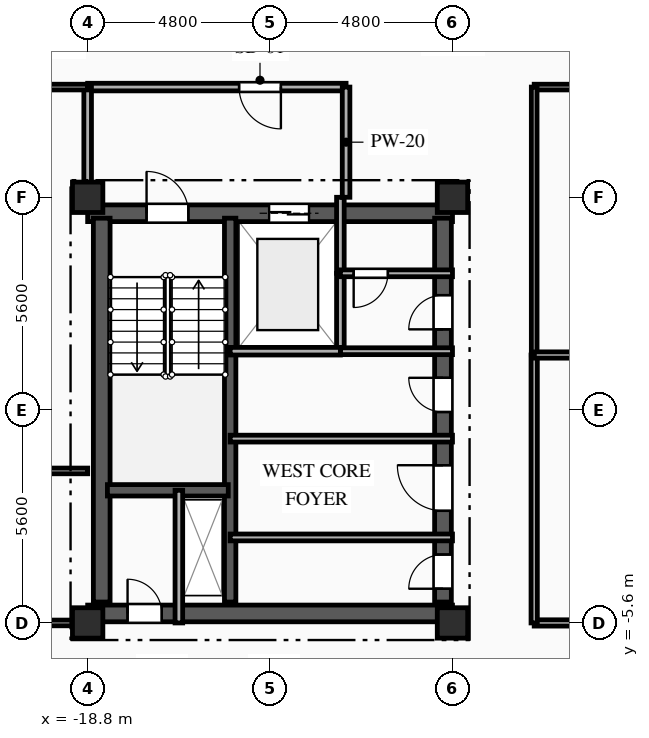
"""IFC4 building model, lengths in metres.
Left out: names, types, materials, properties, quantities, classifications, styles, units other than length and angle.
Written with IfcOpenShell. Run it as: python <this file> out.ifc"""

import sys

from ifc_helpers import new_model, si_unit, direction, frame, frame_2d, origin, origin_2d, place, context, subcontext, project, spatial, rectangle, extrude, element, fill, save


model = new_model("IFC4")
c1 = context("Model", 3, precision=1e-05, world=origin(), true_north=direction((0.0, 1.0)))
c2 = subcontext(c1, "Body", "Model", "MODEL_VIEW")
j1 = project(units=[si_unit("LENGTHUNIT", "METRE"), si_unit("PLANEANGLEUNIT", "RADIAN")], contexts=[c1])
p1 = place(None, origin())
s1 = spatial("IfcSite", under=j1, at=p1, CompositionType="ELEMENT")
p2 = place(p1, origin())
s2 = spatial("IfcBuilding", under=s1, at=p2, CompositionType="ELEMENT")
p3 = place(p2, frame((0.0, 0.0, 228.3)))
s3 = spatial("IfcBuildingStorey", under=s2, at=p3, CompositionType="ELEMENT", Elevation=228.3)
for number, where, z_axis, x_axis in (
    (1, (-18.8, -5.6, 0.0), (0.0, 0.0, 1.0), (1.0, 0.0, 0.0)),
    (2, (-18.8, 5.6, 0.0), (0.0, 0.0, 1.0), (1.0, 0.0, 0.0)),
    (3, (-9.2, -5.6, 0.0), (0.0, 0.0, 1.0), (1.0, 0.0, 0.0)),
    (4, (-9.2, 5.6, 0.0), (0.0, 0.0, 1.0), (1.0, 0.0, 0.0)),
):
    element("IfcColumn", number, at=place(p3, frame(where, z_axis=z_axis, x_axis=x_axis)), inside=s3, PredefinedType="COLUMN", context=c2, shape_type="SweptSolid", body=[
        extrude(rectangle(XDim=0.8, YDim=0.8, at=origin_2d()), origin(), (0.0, 0.0, 1.0), 3.35),
    ])
p4 = place(p3, frame((-18.8, 5.18, 0.0), z_axis=(0.0, 0.0, 1.0), x_axis=(1.0, 0.0, 0.0)))
e5 = element("IfcWall", 5, at=p4, inside=s3, PredefinedType="SHEAR", context=c2, shape_type="SweptSolid", body=[
    extrude(rectangle(XDim=9.6, YDim=0.44, at=frame_2d((4.8, 0.0))), origin(), (0.0, 0.0, 1.0), 3.04),
])
p5 = place(p4, frame((1.55, 0.0, 0.0)))
e6 = element("IfcOpeningElement", 6, at=p5, cuts=e5, PredefinedType="OPENING", context=c2, shape_type="SweptSolid", body=[
    extrude(rectangle(XDim=1.1, YDim=2.15, at=frame_2d((0.55, 1.075))), frame((0.0, 0.23, 0.0), z_axis=(0.0, -1.0, 0.0), x_axis=(1.0, 0.0, 0.0)), (0.0, 0.0, 1.0), 0.46),
])
p6 = place(p4, frame((4.775, 0.0, 0.0)))
e7 = element("IfcOpeningElement", 7, at=p6, cuts=e5, PredefinedType="OPENING", context=c2, shape_type="SweptSolid", body=[
    extrude(rectangle(XDim=1.05, YDim=2.1, at=frame_2d((0.525, 1.05))), frame((0.0, 0.23, 0.0), z_axis=(0.0, -1.0, 0.0), x_axis=(1.0, 0.0, 0.0)), (0.0, 0.0, 1.0), 0.46),
])
p7 = place(p3, frame((-18.8, -5.35, 0.0), z_axis=(0.0, 0.0, 1.0), x_axis=(1.0, 0.0, 0.0)))
e8 = element("IfcWall", 8, at=p7, inside=s3, PredefinedType="SHEAR", context=c2, shape_type="SweptSolid", body=[
    extrude(rectangle(XDim=9.6, YDim=0.44, at=frame_2d((4.8, 0.0))), origin(), (0.0, 0.0, 1.0), 3.04),
])
p8 = place(p7, frame((1.05, 0.0, 0.0)))
e9 = element("IfcOpeningElement", 9, at=p8, cuts=e8, PredefinedType="OPENING", context=c2, shape_type="SweptSolid", body=[
    extrude(rectangle(XDim=0.9, YDim=2.1, at=frame_2d((0.45, 1.05))), frame((0.0, 0.23, 0.0), z_axis=(0.0, -1.0, 0.0), x_axis=(1.0, 0.0, 0.0)), (0.0, 0.0, 1.0), 0.46),
])
p9 = place(p3, frame((-18.43, -5.05, 0.0), z_axis=(0.0, 0.0, 1.0), x_axis=(0.0, 1.0, 0.0)))
e10 = element("IfcWall", 10, at=p9, inside=s3, PredefinedType="SHEAR", context=c2, shape_type="SweptSolid", body=[
    extrude(rectangle(XDim=10.1, YDim=0.44, at=frame_2d((5.05, 0.0))), origin(), (0.0, 0.0, 1.0), 3.04),
])
p10 = place(p3, frame((-9.45, -5.05, 0.0), z_axis=(0.0, 0.0, 1.0), x_axis=(0.0, 1.0, 0.0)))
e11 = element("IfcWall", 11, at=p10, inside=s3, PredefinedType="SHEAR", context=c2, shape_type="SweptSolid", body=[
    extrude(rectangle(XDim=10.1, YDim=0.44, at=frame_2d((5.05, 0.0))), origin(), (0.0, 0.0, 1.0), 3.04),
])
p11 = place(p10, frame((7.175, 0.0, 0.0)))
e12 = element("IfcOpeningElement", 12, at=p11, cuts=e11, PredefinedType="OPENING", context=c2, shape_type="SweptSolid", body=[
    extrude(rectangle(XDim=0.9, YDim=2.1, at=frame_2d((0.45, 1.05))), frame((0.0, 0.23, 0.0), z_axis=(0.0, -1.0, 0.0), x_axis=(1.0, 0.0, 0.0)), (0.0, 0.0, 1.0), 0.46),
])
p12 = place(p10, frame((2.4, 0.0, 0.0)))
e13 = element("IfcOpeningElement", 13, at=p12, cuts=e11, PredefinedType="OPENING", context=c2, shape_type="SweptSolid", body=[
    extrude(rectangle(XDim=1.2, YDim=2.15, at=frame_2d((0.6, 1.075))), frame((0.0, 0.23, 0.0), z_axis=(0.0, -1.0, 0.0), x_axis=(1.0, 0.0, 0.0)), (0.0, 0.0, 1.0), 0.46),
])
p13 = place(p10, frame((0.35, 0.0, 0.0)))
e14 = element("IfcOpeningElement", 14, at=p13, cuts=e11, PredefinedType="OPENING", context=c2, shape_type="SweptSolid", body=[
    extrude(rectangle(XDim=0.9, YDim=2.1, at=frame_2d((0.45, 1.05))), frame((0.0, 0.23, 0.0), z_axis=(0.0, -1.0, 0.0), x_axis=(1.0, 0.0, 0.0)), (0.0, 0.0, 1.0), 0.46),
])
p14 = place(p10, frame((5.0, 0.0, 0.0)))
e15 = element("IfcOpeningElement", 15, at=p14, cuts=e11, PredefinedType="OPENING", context=c2, shape_type="SweptSolid", body=[
    extrude(rectangle(XDim=0.9, YDim=2.1, at=frame_2d((0.45, 1.05))), frame((0.0, 0.23, 0.0), z_axis=(0.0, -1.0, 0.0), x_axis=(1.0, 0.0, 0.0)), (0.0, 0.0, 1.0), 0.46),
])
p15 = place(p3, frame((-15.05, -5.05, 0.0), z_axis=(0.0, 0.0, 1.0), x_axis=(0.0, 1.0, 0.0)))
e16 = element("IfcWall", 16, at=p15, inside=s3, PredefinedType="SHEAR", context=c2, shape_type="SweptSolid", body=[
    extrude(rectangle(XDim=10.1, YDim=0.3, at=frame_2d((5.05, 0.0))), origin(), (0.0, 0.0, 1.0), 3.04),
])
p16 = place(p3, frame((-18.28, -2.11, 0.0), z_axis=(0.0, 0.0, 1.0), x_axis=(1.0, 0.0, 0.0)))
e17 = element("IfcWall", 17, at=p16, inside=s3, PredefinedType="SHEAR", context=c2, shape_type="SweptSolid", body=[
    extrude(rectangle(XDim=3.18, YDim=0.3, at=frame_2d((1.59, 0.0))), origin(), (0.0, 0.0, 1.0), 3.04),
])
p17 = place(p3, frame((-16.4, -5.6, 0.0), z_axis=(0.0, 0.0, 1.0), x_axis=(0.0, 1.0, 0.0)))
e18 = element("IfcWall", 18, at=p17, inside=s3, PredefinedType="PARTITIONING", context=c2, shape_type="SweptSolid", body=[
    extrude(rectangle(XDim=3.49, YDim=0.2, at=frame_2d((1.745, 0.0))), origin(), (0.0, 0.0, 1.0), 3.04),
])
p18 = place(p3, frame((-12.15, 1.55, 0.0), z_axis=(0.0, 0.0, 1.0), x_axis=(0.0, 1.0, 0.0)))
e19 = element("IfcWall", 19, at=p18, inside=s3, PredefinedType="PARTITIONING", context=c2, shape_type="SweptSolid", body=[
    extrude(rectangle(XDim=2.05, YDim=0.2, at=frame_2d((1.025, 0.0))), origin(), (0.0, 0.0, 1.0), 3.04),
])
p19 = place(p3, frame((-12.15, 3.6, 0.0), z_axis=(0.0, 0.0, 1.0), x_axis=(0.0, 1.0, 0.0)))
e20 = element("IfcWall", 20, at=p19, inside=s3, PredefinedType="PARTITIONING", context=c2, shape_type="SweptSolid", body=[
    extrude(rectangle(XDim=2.0, YDim=0.2, at=frame_2d((1.0, 0.0))), origin(), (0.0, 0.0, 1.0), 3.04),
])
p20 = place(p3, frame((-12.0, 8.5, 0.0), z_axis=(0.0, 0.0, 1.0), x_axis=(-1.0, 0.0, 0.0)))
e21 = element("IfcWall", 21, at=p20, inside=s3, PredefinedType="PARTITIONING", context=c2, shape_type="SweptSolid", body=[
    extrude(rectangle(XDim=6.8, YDim=0.2, at=frame_2d((3.4, 0.0))), origin(), (0.0, 0.0, 1.0), 3.04),
])
p21 = place(p20, frame((1.715, 0.0, 0.0)))
e22 = element("IfcOpeningElement", 22, at=p21, cuts=e21, PredefinedType="OPENING", context=c2, shape_type="SweptSolid", body=[
    extrude(rectangle(XDim=1.1, YDim=2.15, at=frame_2d((0.55, 1.075))), frame((0.0, 0.11, 0.0), z_axis=(0.0, -1.0, 0.0), x_axis=(1.0, 0.0, 0.0)), (0.0, 0.0, 1.0), 0.22),
])
p22 = place(p3, frame((-12.0, 5.6, 0.0), z_axis=(0.0, 0.0, 1.0), x_axis=(0.0, 1.0, 0.0)))
e23 = element("IfcWall", 23, at=p22, inside=s3, PredefinedType="PARTITIONING", context=c2, shape_type="SweptSolid", body=[
    extrude(rectangle(XDim=2.9, YDim=0.2, at=frame_2d((1.45, 0.0))), origin(), (0.0, 0.0, 1.0), 3.04),
])
p23 = place(p3, frame((-18.8, 8.5, 0.0), z_axis=(0.0, 0.0, 1.0), x_axis=(0.0, -1.0, 0.0)))
e24 = element("IfcWall", 24, at=p23, inside=s3, PredefinedType="PARTITIONING", context=c2, shape_type="SweptSolid", body=[
    extrude(rectangle(XDim=2.9, YDim=0.2, at=frame_2d((1.45, 0.0))), origin(), (0.0, 0.0, 1.0), 2.665),
])
p24 = place(p3, frame((-9.2, 3.6, 0.0), z_axis=(0.0, 0.0, 1.0), x_axis=(-1.0, 0.0, 0.0)))
e25 = element("IfcWall", 25, at=p24, inside=s3, PredefinedType="PARTITIONING", context=c2, shape_type="SweptSolid", body=[
    extrude(rectangle(XDim=2.95, YDim=0.18, at=frame_2d((1.475, 0.0))), origin(), (0.0, 0.0, 1.0), 3.04),
])
p25 = place(p24, frame((1.7, 0.0, 0.0)))
e26 = element("IfcOpeningElement", 26, at=p25, cuts=e25, PredefinedType="OPENING", context=c2, shape_type="SweptSolid", body=[
    extrude(rectangle(XDim=0.9, YDim=2.1, at=frame_2d((0.45, 1.05))), frame((0.0, 0.1, 0.0), z_axis=(0.0, -1.0, 0.0), x_axis=(1.0, 0.0, 0.0)), (0.0, 0.0, 1.0), 0.2),
])
p26 = place(p3, frame((-12.15, 1.55, 0.0), z_axis=(0.0, 0.0, 1.0), x_axis=(1.0, 0.0, 0.0)))
e27 = element("IfcWall", 27, at=p26, inside=s3, PredefinedType="PARTITIONING", context=c2, shape_type="SweptSolid", body=[
    extrude(rectangle(XDim=2.95, YDim=0.18, at=frame_2d((1.475, 0.0))), origin(), (0.0, 0.0, 1.0), 3.04),
])
p27 = place(p3, frame((-15.05, -3.35, 0.0), z_axis=(0.0, 0.0, 1.0), x_axis=(1.0, 0.0, 0.0)))
e28 = element("IfcWall", 28, at=p27, inside=s3, PredefinedType="PARTITIONING", context=c2, shape_type="SweptSolid", body=[
    extrude(rectangle(XDim=5.85, YDim=0.18, at=frame_2d((2.925, 0.0))), origin(), (0.0, 0.0, 1.0), 2.755),
])
p28 = place(p3, frame((-9.2, -0.75, 0.0), z_axis=(0.0, 0.0, 1.0), x_axis=(-1.0, 0.0, 0.0)))
e29 = element("IfcWall", 29, at=p28, inside=s3, PredefinedType="PARTITIONING", context=c2, shape_type="SweptSolid", body=[
    extrude(rectangle(XDim=5.85, YDim=0.18, at=frame_2d((2.925, 0.0))), origin(), (0.0, 0.0, 1.0), 3.04),
])
p29 = place(p3, frame((-18.8, 8.5, 0.0), z_axis=(0.0, 0.0, 1.0), x_axis=(-1.0, 0.0, 0.0)))
e30 = element("IfcWall", 30, at=p29, inside=s3, PredefinedType="PARTITIONING", context=c2, shape_type="SweptSolid", body=[
    extrude(rectangle(XDim=1.7, YDim=0.15, at=frame_2d((0.85, 0.0))), origin(), (0.0, 0.0, 1.0), 3.04),
])
p30 = place(p3, frame((0.0, 8.5, 0.0), z_axis=(0.0, 0.0, 1.0), x_axis=(-1.0, 0.0, 0.0)))
e31 = element("IfcWall", 31, at=p30, inside=s3, PredefinedType="PARTITIONING", context=c2, shape_type="SweptSolid", body=[
    extrude(rectangle(XDim=7.05, YDim=0.15, at=frame_2d((3.525, 0.0))), origin(), (0.0, 0.0, 1.0), 3.04),
])
p31 = place(p30, frame((2.395, 0.0, 0.0)))
e32 = element("IfcOpeningElement", 32, at=p31, cuts=e31, PredefinedType="OPENING", context=c2, shape_type="SweptSolid", body=[
    extrude(rectangle(XDim=1.05, YDim=2.15, at=frame_2d((0.525, 1.075))), frame((0.0, 0.085, 0.0), z_axis=(0.0, -1.0, 0.0), x_axis=(1.0, 0.0, 0.0)), (0.0, 0.0, 1.0), 0.17),
])
p32 = place(p3, frame((-20.5, -5.6, 0.0), z_axis=(0.0, 0.0, 1.0), x_axis=(1.0, 0.0, 0.0)))
e33 = element("IfcWall", 33, at=p32, inside=s3, PredefinedType="PARTITIONING", context=c2, shape_type="SweptSolid", body=[
    extrude(rectangle(XDim=1.7, YDim=0.15, at=frame_2d((0.85, 0.0))), origin(), (0.0, 0.0, 1.0), 3.04),
])
p33 = place(p3, frame((-7.05, -5.6, 0.0), z_axis=(0.0, 0.0, 1.0), x_axis=(1.0, 0.0, 0.0)))
e34 = element("IfcWall", 34, at=p33, inside=s3, PredefinedType="PARTITIONING", context=c2, shape_type="SweptSolid", body=[
    extrude(rectangle(XDim=7.05, YDim=0.165, at=frame_2d((3.525, 0.0))), origin(), (0.0, 0.0, 1.0), 2.525),
])
p34 = place(p33, frame((4.728, 0.0, 0.0)))
e35 = element("IfcOpeningElement", 35, at=p34, cuts=e34, PredefinedType="OPENING", context=c2, shape_type="SweptSolid", body=[
    extrude(rectangle(XDim=1.15, YDim=2.15, at=frame_2d((0.575, 1.075))), frame((0.0, 0.093, 0.0), z_axis=(0.0, -1.0, 0.0), x_axis=(1.0, 0.0, 0.0)), (0.0, 0.0, 1.0), 0.185),
])
p35 = place(p3, frame((-7.05, 1.45, 0.0), z_axis=(0.0, 0.0, 1.0), x_axis=(0.0, -1.0, 0.0)))
e36 = element("IfcWall", 36, at=p35, inside=s3, PredefinedType="PARTITIONING", context=c2, shape_type="SweptSolid", body=[
    extrude(rectangle(XDim=7.05, YDim=0.165, at=frame_2d((3.525, 0.0))), origin(), (0.0, 0.0, 1.0), 3.04),
])
p36 = place(p3, frame((-7.05, 8.5, 0.0), z_axis=(0.0, 0.0, 1.0), x_axis=(0.0, -1.0, 0.0)))
e37 = element("IfcWall", 37, at=p36, inside=s3, PredefinedType="PARTITIONING", context=c2, shape_type="SweptSolid", body=[
    extrude(rectangle(XDim=7.05, YDim=0.15, at=frame_2d((3.525, 0.0))), origin(), (0.0, 0.0, 1.0), 3.04),
])
p37 = place(p3, frame((-24.0, -1.6, 0.0), z_axis=(0.0, 0.0, 1.0), x_axis=(1.0, 0.0, 0.0)))
e38 = element("IfcWall", 38, at=p37, inside=s3, PredefinedType="PARTITIONING", context=c2, shape_type="SweptSolid", body=[
    extrude(rectangle(XDim=5.2, YDim=0.15, at=frame_2d((2.6, 0.0))), origin(), (0.0, 0.0, 1.0), 3.04),
])
p38 = place(p3, frame((-7.05, 1.45, 0.0), z_axis=(0.0, 0.0, 1.0), x_axis=(1.0, 0.0, 0.0)))
e39 = element("IfcWall", 39, at=p38, inside=s3, PredefinedType="PARTITIONING", context=c2, shape_type="SweptSolid", body=[
    extrude(rectangle(XDim=14.1, YDim=0.165, at=frame_2d((7.05, 0.0))), origin(), (0.0, 0.0, 1.0), 3.04),
])
p39 = place(p3, frame((-15.05, 1.55, 0.0), z_axis=(0.0, 0.0, 1.0), x_axis=(1.0, 0.0, 0.0)))
e40 = element("IfcWall", 40, at=p39, inside=s3, PredefinedType="PARTITIONING", context=c2, shape_type="SweptSolid", body=[
    extrude(rectangle(XDim=2.9, YDim=0.2, at=frame_2d((1.45, 0.0))), origin(), (0.0, 0.0, 1.0), 3.04),
])
p40 = place(p5, origin())
e41 = element("IfcDoor", 41, at=p40, inside=s3, OperationType="SINGLE_SWING_LEFT", PredefinedType="DOOR", context=c2, shape_type="SweptSolid", body=[
    extrude(rectangle(XDim=1.1, YDim=2.15, at=frame_2d((0.55, 1.075))), frame((0.0, 0.025, 0.0), z_axis=(0.0, -1.0, 0.0), x_axis=(1.0, 0.0, 0.0)), (0.0, 0.0, 1.0), 0.05),
])
fill(e6, e41)
p41 = place(p6, origin())
e42 = element("IfcDoor", 42, at=p41, inside=s3, OperationType="DOUBLE_DOOR_SLIDING", PredefinedType="DOOR", context=c2, shape_type="SweptSolid", body=[
    extrude(rectangle(XDim=1.05, YDim=2.1, at=frame_2d((0.525, 1.05))), frame((0.0, 0.025, 0.0), z_axis=(0.0, -1.0, 0.0), x_axis=(1.0, 0.0, 0.0)), (0.0, 0.0, 1.0), 0.05),
])
fill(e7, e42)
p42 = place(p8, origin())
e43 = element("IfcDoor", 43, at=p42, inside=s3, OperationType="SINGLE_SWING_LEFT", PredefinedType="DOOR", context=c2, shape_type="SweptSolid", body=[
    extrude(rectangle(XDim=0.9, YDim=2.1, at=frame_2d((0.45, 1.05))), frame((0.0, 0.025, 0.0), z_axis=(0.0, -1.0, 0.0), x_axis=(1.0, 0.0, 0.0)), (0.0, 0.0, 1.0), 0.05),
])
fill(e9, e43)
p43 = place(p21, origin())
e44 = element("IfcDoor", 44, at=p43, inside=s3, OperationType="SINGLE_SWING_LEFT", PredefinedType="DOOR", context=c2, shape_type="SweptSolid", body=[
    extrude(rectangle(XDim=1.1, YDim=2.15, at=frame_2d((0.55, 1.075))), frame((0.0, 0.025, 0.0), z_axis=(0.0, -1.0, 0.0), x_axis=(1.0, 0.0, 0.0)), (0.0, 0.0, 1.0), 0.05),
])
fill(e22, e44)
p44 = place(p25, origin())
e45 = element("IfcDoor", 45, at=p44, inside=s3, OperationType="SINGLE_SWING_RIGHT", PredefinedType="DOOR", context=c2, shape_type="SweptSolid", body=[
    extrude(rectangle(XDim=0.9, YDim=2.1, at=frame_2d((0.45, 1.05))), frame((0.0, 0.025, 0.0), z_axis=(0.0, -1.0, 0.0), x_axis=(1.0, 0.0, 0.0)), (0.0, 0.0, 1.0), 0.05),
])
fill(e26, e45)
p45 = place(p11, origin())
e46 = element("IfcDoor", 46, at=p45, inside=s3, OperationType="SINGLE_SWING_LEFT", PredefinedType="DOOR", context=c2, shape_type="SweptSolid", body=[
    extrude(rectangle(XDim=0.9, YDim=2.1, at=frame_2d((0.45, 1.05))), frame((0.0, 0.025, 0.0), z_axis=(0.0, -1.0, 0.0), x_axis=(1.0, 0.0, 0.0)), (0.0, 0.0, 1.0), 0.05),
])
fill(e12, e46)
p46 = place(p12, origin())
e47 = element("IfcDoor", 47, at=p46, inside=s3, OperationType="SINGLE_SWING_RIGHT", PredefinedType="DOOR", context=c2, shape_type="SweptSolid", body=[
    extrude(rectangle(XDim=1.2, YDim=2.15, at=frame_2d((0.6, 1.075))), frame((0.0, 0.025, 0.0), z_axis=(0.0, -1.0, 0.0), x_axis=(1.0, 0.0, 0.0)), (0.0, 0.0, 1.0), 0.05),
])
fill(e13, e47)
p47 = place(p13, origin())
e48 = element("IfcDoor", 48, at=p47, inside=s3, OperationType="SINGLE_SWING_LEFT", PredefinedType="DOOR", context=c2, shape_type="SweptSolid", body=[
    extrude(rectangle(XDim=0.9, YDim=2.1, at=frame_2d((0.45, 1.05))), frame((0.0, 0.025, 0.0), z_axis=(0.0, -1.0, 0.0), x_axis=(1.0, 0.0, 0.0)), (0.0, 0.0, 1.0), 0.05),
])
fill(e14, e48)
p48 = place(p14, origin())
e49 = element("IfcDoor", 49, at=p48, inside=s3, OperationType="SINGLE_SWING_RIGHT", PredefinedType="DOOR", context=c2, shape_type="SweptSolid", body=[
    extrude(rectangle(XDim=0.9, YDim=2.1, at=frame_2d((0.45, 1.05))), frame((0.0, 0.025, 0.0), z_axis=(0.0, -1.0, 0.0), x_axis=(1.0, 0.0, 0.0)), (0.0, 0.0, 1.0), 0.05),
])
fill(e15, e49)
save(model, sys.argv[1])
